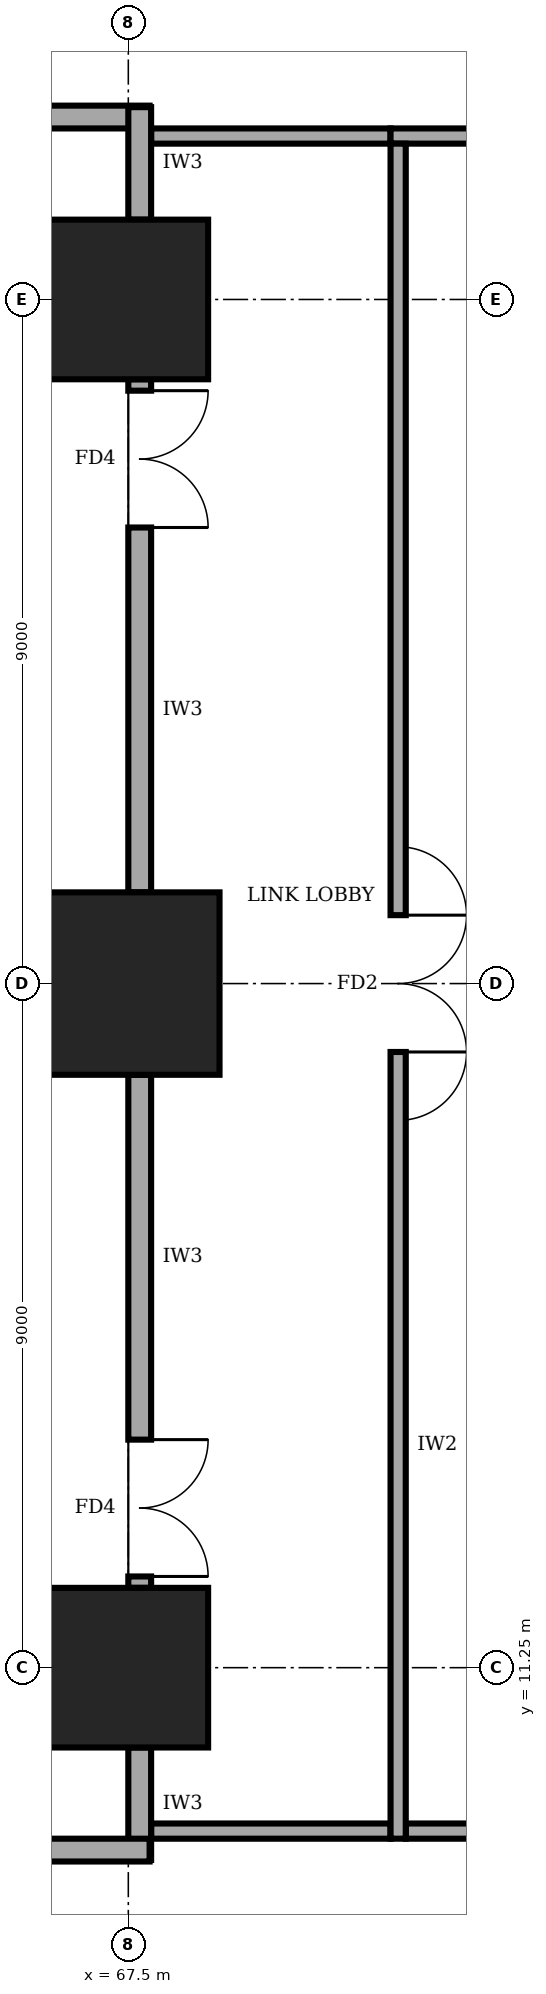
"""IFC4 building model, lengths in metres.
Left out: names, types, materials, properties, quantities, classifications, styles, units other than length and angle.
Written with IfcOpenShell. Run it as: python <this file> out.ifc"""

import sys

from ifc_helpers import new_model, si_unit, direction, frame, frame_2d, origin, origin_2d, place, context, subcontext, project, spatial, rectangle, extrude, element, fill, save


model = new_model("IFC4")
c1 = context("Model", 3, precision=1e-05, world=origin(), true_north=direction((0.0, 1.0)))
c2 = subcontext(c1, "Body", "Model", "MODEL_VIEW")
j1 = project(units=[si_unit("LENGTHUNIT", "METRE"), si_unit("PLANEANGLEUNIT", "RADIAN")], contexts=[c1])
p1 = place(None, origin())
s1 = spatial("IfcSite", under=j1, at=p1, CompositionType="ELEMENT")
p2 = place(p1, origin())
s2 = spatial("IfcBuilding", under=s1, at=p2, CompositionType="ELEMENT")
p3 = place(p2, frame((0.0, 0.0, 125.0)))
s3 = spatial("IfcBuildingStorey", under=s2, at=p3, CompositionType="ELEMENT", Elevation=125.0)
p4 = place(p3, frame((67.5, 11.25, 0.0), z_axis=(0.0, 0.0, 1.0), x_axis=(1.0, 0.0, 0.0)))
e1 = element("IfcColumn", 1, at=p4, inside=s3, PredefinedType="COLUMN", context=c2, shape_type="SweptSolid", body=[
    extrude(rectangle(XDim=2.1, YDim=2.1, at=origin_2d()), origin(), (0.0, 0.0, 1.0), 4.0),
])
p5 = place(p3, frame((67.5, 20.25, 0.0), z_axis=(0.0, 0.0, 1.0), x_axis=(1.0, 0.0, 0.0)))
e2 = element("IfcColumn", 2, at=p5, inside=s3, PredefinedType="COLUMN", context=c2, shape_type="SweptSolid", body=[
    extrude(rectangle(XDim=2.4, YDim=2.4, at=origin_2d()), origin(), (0.0, 0.0, 1.0), 4.0),
])
p6 = place(p3, frame((67.5, 29.25, 0.0), z_axis=(0.0, 0.0, 1.0), x_axis=(1.0, 0.0, 0.0)))
e3 = element("IfcColumn", 3, at=p6, inside=s3, PredefinedType="COLUMN", context=c2, shape_type="SweptSolid", body=[
    extrude(rectangle(XDim=2.1, YDim=2.1, at=origin_2d()), origin(), (0.0, 0.0, 1.0), 4.0),
])
p7 = place(p3, frame((63.02, 31.65, 0.0), z_axis=(0.0, 0.0, 1.0), x_axis=(1.0, 0.0, 0.0)))
e4 = element("IfcWall", 4, at=p7, inside=s3, PredefinedType="SOLIDWALL", context=c2, shape_type="SweptSolid", body=[
    extrude(rectangle(XDim=4.76, YDim=0.3, at=frame_2d((2.38, 0.0))), origin(), (0.0, 0.0, 1.0), 3.75),
])
p8 = place(p3, frame((67.65, 31.78, 0.0), z_axis=(0.0, 0.0, 1.0), x_axis=(0.0, -1.0, 0.0)))
e5 = element("IfcWall", 5, at=p8, inside=s3, PredefinedType="SOLIDWALL", context=c2, shape_type="SweptSolid", body=[
    extrude(rectangle(XDim=1.48, YDim=0.3, at=frame_2d((0.74, 0.0))), origin(), (0.0, 0.0, 1.0), 2.65),
])
p9 = place(p3, frame((67.65, 28.2, 0.0), z_axis=(0.0, 0.0, 1.0), x_axis=(0.0, -1.0, 0.0)))
e6 = element("IfcWall", 6, at=p9, inside=s3, PredefinedType="SOLIDWALL", context=c2, shape_type="SweptSolid", body=[
    extrude(rectangle(XDim=6.75, YDim=0.3, at=frame_2d((3.375, 0.0))), origin(), (0.0, 0.0, 1.0), 2.65),
])
p10 = place(p9, frame((0.15, 0.0, 0.0)))
e7 = element("IfcOpeningElement", 7, at=p10, cuts=e6, PredefinedType="OPENING", context=c2, shape_type="SweptSolid", body=[
    extrude(rectangle(XDim=1.8, YDim=2.1, at=frame_2d((0.9, 1.05))), frame((0.0, 0.16, 0.0), z_axis=(0.0, -1.0, 0.0), x_axis=(1.0, 0.0, 0.0)), (0.0, 0.0, 1.0), 0.32),
])
p11 = place(p3, frame((67.65, 19.05, 0.0), z_axis=(0.0, 0.0, 1.0), x_axis=(0.0, -1.0, 0.0)))
e8 = element("IfcWall", 8, at=p11, inside=s3, PredefinedType="SOLIDWALL", context=c2, shape_type="SweptSolid", body=[
    extrude(rectangle(XDim=6.75, YDim=0.3, at=frame_2d((3.375, 0.0))), origin(), (0.0, 0.0, 1.0), 2.65),
])
p12 = place(p11, frame((4.8, 0.0, 0.0)))
e9 = element("IfcOpeningElement", 9, at=p12, cuts=e8, PredefinedType="OPENING", context=c2, shape_type="SweptSolid", body=[
    extrude(rectangle(XDim=1.8, YDim=2.1, at=frame_2d((0.9, 1.05))), frame((0.0, 0.16, 0.0), z_axis=(0.0, -1.0, 0.0), x_axis=(1.0, 0.0, 0.0)), (0.0, 0.0, 1.0), 0.32),
])
p13 = place(p3, frame((67.65, 10.2, 0.0), z_axis=(0.0, 0.0, 1.0), x_axis=(0.0, -1.0, 0.0)))
e10 = element("IfcWall", 10, at=p13, inside=s3, PredefinedType="SOLIDWALL", context=c2, shape_type="SweptSolid", body=[
    extrude(rectangle(XDim=1.48, YDim=0.3, at=frame_2d((0.74, 0.0))), origin(), (0.0, 0.0, 1.0), 2.65),
])
p14 = place(p3, frame((67.78, 8.85, 0.0), z_axis=(0.0, 0.0, 1.0), x_axis=(-1.0, 0.0, 0.0)))
e11 = element("IfcWall", 11, at=p14, inside=s3, PredefinedType="SOLIDWALL", context=c2, shape_type="SweptSolid", body=[
    extrude(rectangle(XDim=4.76, YDim=0.3, at=frame_2d((2.38, 0.0))), origin(), (0.0, 0.0, 1.0), 3.75),
])
p15 = place(p3, frame((71.15, 9.1, 0.0), z_axis=(0.0, 0.0, 1.0), x_axis=(1.0, 0.0, 0.0)))
e12 = element("IfcWall", 12, at=p15, inside=s3, PredefinedType="SOLIDWALL", context=c2, shape_type="SweptSolid", body=[
    extrude(rectangle(XDim=18.4, YDim=0.2, at=frame_2d((9.2, 0.0))), origin(), (0.0, 0.0, 1.0), 3.75),
])
p16 = place(p15, frame((2.075, 0.0, 0.0)))
e13 = element("IfcOpeningElement", 13, at=p16, cuts=e12, PredefinedType="OPENING", context=c2, shape_type="SweptSolid", body=[
    extrude(rectangle(XDim=1.0, YDim=2.1, at=frame_2d((0.5, 1.05))), frame((0.0, 0.11, 0.0), z_axis=(0.0, -1.0, 0.0), x_axis=(1.0, 0.0, 0.0)), (0.0, 0.0, 1.0), 0.22),
])
p17 = place(p15, frame((9.35, 0.0, 0.0)))
e14 = element("IfcOpeningElement", 14, at=p17, cuts=e12, PredefinedType="OPENING", context=c2, shape_type="SweptSolid", body=[
    extrude(rectangle(XDim=1.0, YDim=2.1, at=frame_2d((0.5, 1.05))), frame((0.0, 0.11, 0.0), z_axis=(0.0, -1.0, 0.0), x_axis=(1.0, 0.0, 0.0)), (0.0, 0.0, 1.0), 0.22),
])
p18 = place(p15, frame((15.875, 0.0, 0.0)))
e15 = element("IfcOpeningElement", 15, at=p18, cuts=e12, PredefinedType="OPENING", context=c2, shape_type="SweptSolid", body=[
    extrude(rectangle(XDim=1.0, YDim=2.1, at=frame_2d((0.5, 1.05))), frame((0.0, 0.11, 0.0), z_axis=(0.0, -1.0, 0.0), x_axis=(1.0, 0.0, 0.0)), (0.0, 0.0, 1.0), 0.22),
])
p19 = place(p3, frame((89.35, 31.4, 0.0), z_axis=(0.0, 0.0, 1.0), x_axis=(-1.0, 0.0, 0.0)))
e16 = element("IfcWall", 16, at=p19, inside=s3, PredefinedType="SOLIDWALL", context=c2, shape_type="SweptSolid", body=[
    extrude(rectangle(XDim=18.4, YDim=0.2, at=frame_2d((9.2, 0.0))), origin(), (0.0, 0.0, 1.0), 3.75),
])
p20 = place(p19, frame((14.725, 0.0, 0.0)))
e17 = element("IfcOpeningElement", 17, at=p20, cuts=e16, PredefinedType="OPENING", context=c2, shape_type="SweptSolid", body=[
    extrude(rectangle(XDim=1.8, YDim=2.1, at=frame_2d((0.9, 1.05))), frame((0.0, 0.11, 0.0), z_axis=(0.0, -1.0, 0.0), x_axis=(1.0, 0.0, 0.0)), (0.0, 0.0, 1.0), 0.22),
])
p21 = place(p19, frame((7.85, 0.0, 0.0)))
e18 = element("IfcOpeningElement", 18, at=p21, cuts=e16, PredefinedType="OPENING", context=c2, shape_type="SweptSolid", body=[
    extrude(rectangle(XDim=1.0, YDim=2.1, at=frame_2d((0.5, 1.05))), frame((0.0, 0.11, 0.0), z_axis=(0.0, -1.0, 0.0), x_axis=(1.0, 0.0, 0.0)), (0.0, 0.0, 1.0), 0.22),
])
p22 = place(p19, frame((1.325, 0.0, 0.0)))
e19 = element("IfcOpeningElement", 19, at=p22, cuts=e16, PredefinedType="OPENING", context=c2, shape_type="SweptSolid", body=[
    extrude(rectangle(XDim=1.0, YDim=2.1, at=frame_2d((0.5, 1.05))), frame((0.0, 0.11, 0.0), z_axis=(0.0, -1.0, 0.0), x_axis=(1.0, 0.0, 0.0)), (0.0, 0.0, 1.0), 0.22),
])
p23 = place(p3, frame((71.05, 31.3, 0.0), z_axis=(0.0, 0.0, 1.0), x_axis=(0.0, -1.0, 0.0)))
e20 = element("IfcWall", 20, at=p23, inside=s3, PredefinedType="SOLIDWALL", context=c2, shape_type="SweptSolid", body=[
    extrude(rectangle(XDim=22.3, YDim=0.2, at=frame_2d((11.15, 0.0))), origin(), (0.0, 0.0, 1.0), 3.75),
])
p24 = place(p23, frame((10.15, 0.0, 0.0)))
e21 = element("IfcOpeningElement", 21, at=p24, cuts=e20, PredefinedType="OPENING", context=c2, shape_type="SweptSolid", body=[
    extrude(rectangle(XDim=1.8, YDim=2.1, at=frame_2d((0.9, 1.05))), frame((0.0, 0.11, 0.0), z_axis=(0.0, -1.0, 0.0), x_axis=(1.0, 0.0, 0.0)), (0.0, 0.0, 1.0), 0.22),
])
for number, where, z_axis, x_axis in (
    (22, (67.8, 9.1, 0.0), (0.0, 0.0, 1.0), (1.0, 0.0, 0.0)),
    (23, (67.8, 31.4, 0.0), (0.0, 0.0, 1.0), (1.0, 0.0, 0.0)),
):
    element("IfcWall", number, at=place(p3, frame(where, z_axis=z_axis, x_axis=x_axis)), inside=s3, PredefinedType="SOLIDWALL", context=c2, shape_type="SweptSolid", body=[
        extrude(rectangle(XDim=3.15, YDim=0.2, at=frame_2d((1.575, 0.0))), origin(), (0.0, 0.0, 1.0), 3.75),
    ])
p25 = place(p3, frame((63.5, 15.1, 0.0), z_axis=(0.0, 0.0, 1.0), x_axis=(1.0, 0.0, 0.0)))
e24 = element("IfcWall", 24, at=p25, inside=s3, PredefinedType="SOLIDWALL", context=c2, shape_type="SweptSolid", body=[
    extrude(rectangle(XDim=4.0, YDim=0.2, at=frame_2d((2.0, 0.0))), origin(), (0.0, 0.0, 1.0), 3.75),
])
p26 = place(p25, frame((1.15, 0.0, 0.0)))
e25 = element("IfcOpeningElement", 25, at=p26, cuts=e24, PredefinedType="OPENING", context=c2, shape_type="SweptSolid", body=[
    extrude(rectangle(XDim=1.8, YDim=2.1, at=frame_2d((0.9, 1.05))), frame((0.0, 0.11, 0.0), z_axis=(0.0, -1.0, 0.0), x_axis=(1.0, 0.0, 0.0)), (0.0, 0.0, 1.0), 0.22),
])
p27 = place(p3, frame((63.5, 25.4, 0.0), z_axis=(0.0, 0.0, 1.0), x_axis=(1.0, 0.0, 0.0)))
e26 = element("IfcWall", 26, at=p27, inside=s3, PredefinedType="SOLIDWALL", context=c2, shape_type="SweptSolid", body=[
    extrude(rectangle(XDim=4.0, YDim=0.2, at=frame_2d((2.0, 0.0))), origin(), (0.0, 0.0, 1.0), 3.75),
])
p28 = place(p27, frame((1.15, 0.0, 0.0)))
e27 = element("IfcOpeningElement", 27, at=p28, cuts=e26, PredefinedType="OPENING", context=c2, shape_type="SweptSolid", body=[
    extrude(rectangle(XDim=1.8, YDim=2.1, at=frame_2d((0.9, 1.05))), frame((0.0, 0.11, 0.0), z_axis=(0.0, -1.0, 0.0), x_axis=(1.0, 0.0, 0.0)), (0.0, 0.0, 1.0), 0.22),
])
p29 = place(p24, origin())
e28 = element("IfcDoor", 28, at=p29, inside=s3, OperationType="DOUBLE_DOOR_SINGLE_SWING", PredefinedType="DOOR", context=c2, shape_type="SweptSolid", body=[
    extrude(rectangle(XDim=1.8, YDim=2.1, at=frame_2d((0.9, 1.05))), frame((0.0, 0.025, 0.0), z_axis=(0.0, -1.0, 0.0), x_axis=(1.0, 0.0, 0.0)), (0.0, 0.0, 1.0), 0.05),
])
fill(e21, e28)
p30 = place(p10, origin())
e29 = element("IfcDoor", 29, at=p30, inside=s3, OperationType="DOUBLE_DOOR_SINGLE_SWING", PredefinedType="DOOR", context=c2, shape_type="SweptSolid", body=[
    extrude(rectangle(XDim=1.8, YDim=2.1, at=frame_2d((0.9, 1.05))), frame((0.0, 0.025, 0.0), z_axis=(0.0, -1.0, 0.0), x_axis=(1.0, 0.0, 0.0)), (0.0, 0.0, 1.0), 0.05),
])
fill(e7, e29)
p31 = place(p12, origin())
e30 = element("IfcDoor", 30, at=p31, inside=s3, OperationType="DOUBLE_DOOR_SINGLE_SWING", PredefinedType="DOOR", context=c2, shape_type="SweptSolid", body=[
    extrude(rectangle(XDim=1.8, YDim=2.1, at=frame_2d((0.9, 1.05))), frame((0.0, 0.025, 0.0), z_axis=(0.0, -1.0, 0.0), x_axis=(1.0, 0.0, 0.0)), (0.0, 0.0, 1.0), 0.05),
])
fill(e9, e30)
save(model, sys.argv[1])
